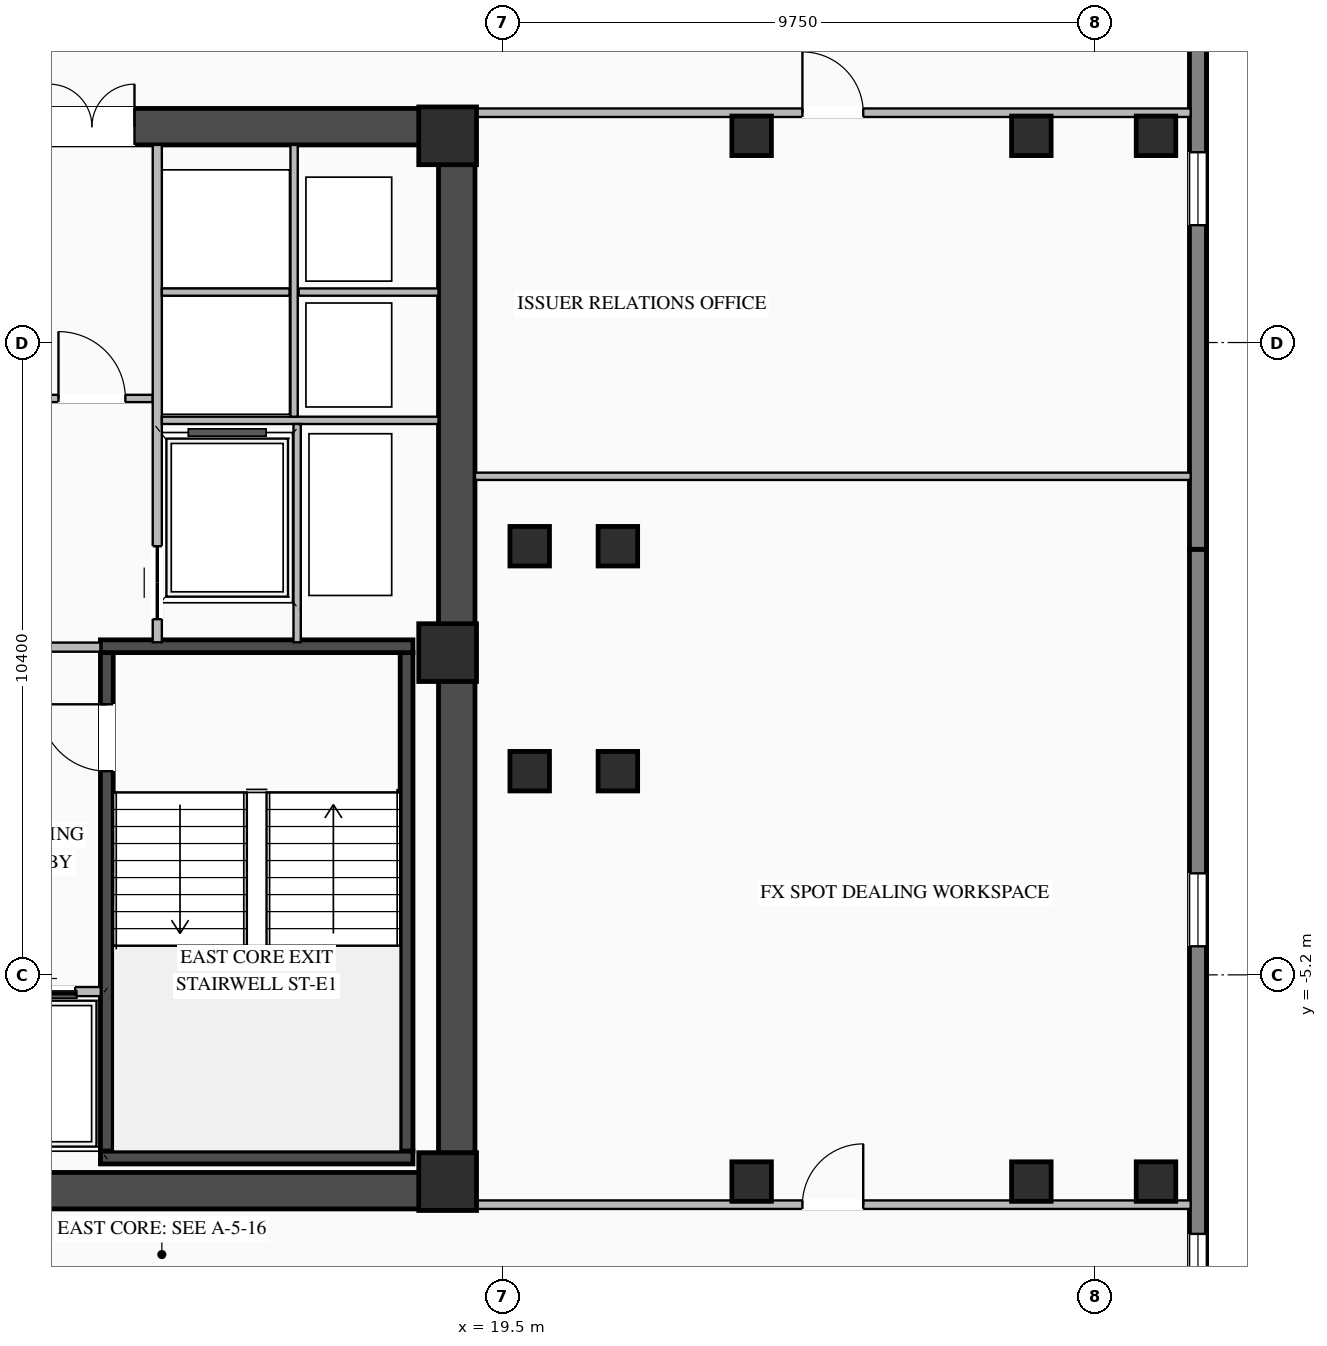
"""IFC4 building model, lengths in metres.
Left out: names, types, materials, properties, quantities, classifications, styles, units other than length and angle.
Written with IfcOpenShell. Run it as: python <this file> out.ifc"""

import sys

from ifc_helpers import new_model, si_unit, direction, frame, frame_2d, origin, origin_2d, place, context, subcontext, project, spatial, rectangle, i_section, extrude, element, fill, save


model = new_model("IFC4")
c1 = context("Model", 3, precision=1e-05, world=origin(), true_north=direction((0.0, 1.0)))
c2 = subcontext(c1, "Body", "Model", "MODEL_VIEW")
j1 = project(units=[si_unit("LENGTHUNIT", "METRE"), si_unit("PLANEANGLEUNIT", "RADIAN")], contexts=[c1])
p1 = place(None, origin())
s1 = spatial("IfcSite", under=j1, at=p1, CompositionType="ELEMENT")
p2 = place(p1, origin())
s2 = spatial("IfcBuilding", under=s1, at=p2, CompositionType="ELEMENT")
p3 = place(p2, frame((0.0, 0.0, 131.2)))
s3 = spatial("IfcBuildingStorey", under=s2, at=p3, CompositionType="ELEMENT", Elevation=131.2)
p4 = place(p3, frame((8.8, -8.75, 0.0), z_axis=(0.0, 0.0, 1.0), x_axis=(1.0, 0.0, 0.0)))
e1 = element("IfcWall", 1, at=p4, inside=s3, PredefinedType="SHEAR", context=c2, shape_type="SweptSolid", body=[
    extrude(rectangle(XDim=10.25, YDim=0.6, at=frame_2d((5.125, 0.0))), origin(), (0.0, 0.0, 1.0), 3.27),
])
p5 = place(p3, frame((8.8, 8.75, 0.0), z_axis=(0.0, 0.0, 1.0), x_axis=(1.0, 0.0, 0.0)))
e2 = element("IfcWall", 2, at=p5, inside=s3, PredefinedType="SHEAR", context=c2, shape_type="SweptSolid", body=[
    extrude(rectangle(XDim=10.25, YDim=0.6, at=frame_2d((5.125, 0.0))), origin(), (0.0, 0.0, 1.0), 3.27),
])
p6 = place(p5, frame((3.25, 0.0, 0.0)))
e3 = element("IfcOpeningElement", 3, at=p6, cuts=e2, PredefinedType="OPENING", context=c2, shape_type="SweptSolid", body=[
    extrude(rectangle(XDim=1.4, YDim=2.05, at=frame_2d((0.7, 1.025))), frame((0.0, 0.31, 0.0), z_axis=(0.0, -1.0, 0.0), x_axis=(1.0, 0.0, 0.0)), (0.0, 0.0, 1.0), 0.62),
])
p7 = place(p3, frame((18.75, -8.45, 0.0), z_axis=(0.0, 0.0, 1.0), x_axis=(0.0, 1.0, 0.0)))
e4 = element("IfcWall", 4, at=p7, inside=s3, PredefinedType="SHEAR", context=c2, shape_type="SweptSolid", body=[
    extrude(rectangle(XDim=16.9, YDim=0.6, at=frame_2d((8.45, 0.0))), origin(), (0.0, 0.0, 1.0), 3.27),
])
p8 = place(p3, frame((12.995, -8.1, 0.0), z_axis=(0.0, 0.0, 1.0), x_axis=(0.0, 1.0, 0.0)))
e5 = element("IfcWall", 5, at=p8, inside=s3, PredefinedType="SHEAR", context=c2, shape_type="SweptSolid", body=[
    extrude(rectangle(XDim=8.2, YDim=0.21, at=frame_2d((4.1, 0.0))), origin(), (0.0, 0.0, 1.0), 3.27),
])
p9 = place(p8, frame((6.25, 0.0, 0.0)))
e6 = element("IfcOpeningElement", 6, at=p9, cuts=e5, PredefinedType="OPENING", context=c2, shape_type="SweptSolid", body=[
    extrude(rectangle(XDim=1.1, YDim=2.15, at=frame_2d((0.55, 1.075))), frame((0.0, 0.115, 0.0), z_axis=(0.0, -1.0, 0.0), x_axis=(1.0, 0.0, 0.0)), (0.0, 0.0, 1.0), 0.23),
])
p10 = place(p3, frame((17.925, -8.1, 0.0), z_axis=(0.0, 0.0, 1.0), x_axis=(0.0, 1.0, 0.0)))
e7 = element("IfcWall", 7, at=p10, inside=s3, PredefinedType="SHEAR", context=c2, shape_type="SweptSolid", body=[
    extrude(rectangle(XDim=8.2, YDim=0.21, at=frame_2d((4.1, 0.0))), origin(), (0.0, 0.0, 1.0), 3.27),
])
for number, where, z_axis, x_axis in (
    (8, (12.89, -8.205, 0.0), (0.0, 0.0, 1.0), (1.0, 0.0, 0.0)),
    (9, (18.03, 0.205, 0.0), (0.0, 0.0, 1.0), (-1.0, 0.0, 0.0)),
):
    element("IfcWall", number, at=place(p3, frame(where, z_axis=z_axis, x_axis=x_axis)), inside=s3, PredefinedType="SHEAR", context=c2, shape_type="SweptSolid", body=[
        extrude(rectangle(XDim=5.14, YDim=0.21, at=frame_2d((2.57, 0.0))), origin(), (0.0, 0.0, 1.0), 3.27),
    ])
for number, where, z_axis, x_axis in (
    (10, (18.6, -8.6, 0.0), (0.0, 0.0, 1.0), (1.0, 0.0, 0.0)),
    (11, (18.6, 0.1, 0.0), (0.0, 0.0, 1.0), (1.0, 0.0, 0.0)),
    (12, (18.6, 8.6, 0.0), (0.0, 0.0, 1.0), (1.0, 0.0, 0.0)),
):
    element("IfcColumn", number, at=place(p3, frame(where, z_axis=z_axis, x_axis=x_axis)), inside=s3, PredefinedType="COLUMN", context=c2, shape_type="SweptSolid", body=[
        extrude(rectangle(XDim=0.95, YDim=0.95, at=origin_2d()), origin(), (0.0, 0.0, 1.0), 3.45),
    ])
for number, where, z_axis, x_axis in (
    (13, (19.95, -1.85, 0.0), (0.0, 0.0, 1.0), (1.0, 0.0, 0.0)),
    (14, (19.95, 1.85, 0.0), (0.0, 0.0, 1.0), (1.0, 0.0, 0.0)),
    (15, (21.4, -1.85, 0.0), (0.0, 0.0, 1.0), (1.0, 0.0, 0.0)),
    (16, (21.4, 1.85, 0.0), (0.0, 0.0, 1.0), (1.0, 0.0, 0.0)),
    (17, (23.6, -8.6, 0.0), (0.0, 0.0, 1.0), (1.0, 0.0, 0.0)),
    (18, (23.6, 8.6, 0.0), (0.0, 0.0, 1.0), (1.0, 0.0, 0.0)),
    (19, (28.2, -8.6, 0.0), (0.0, 0.0, 1.0), (1.0, 0.0, 0.0)),
    (20, (28.2, 8.6, 0.0), (0.0, 0.0, 1.0), (1.0, 0.0, 0.0)),
    (21, (30.25, -8.6, 0.0), (0.0, 0.0, 1.0), (1.0, 0.0, 0.0)),
    (22, (30.25, 8.6, 0.0), (0.0, 0.0, 1.0), (1.0, 0.0, 0.0)),
):
    element("IfcColumn", number, at=place(p3, frame(where, z_axis=z_axis, x_axis=x_axis)), inside=s3, PredefinedType="COLUMN", context=c2, shape_type="SweptSolid", body=[
        extrude(i_section(OverallWidth=0.65, OverallDepth=0.65, WebThickness=0.028, FlangeThickness=0.04, at=origin_2d()), origin(), (0.0, 0.0, 1.0), 3.45),
    ])
p11 = place(p3, frame((30.94, 1.8, 0.0), z_axis=(0.0, 0.0, 1.0), x_axis=(0.0, -1.0, 0.0)))
e23 = element("IfcWall", 23, at=p11, inside=s3, PredefinedType="STANDARD", context=c2, shape_type="SweptSolid", body=[
    extrude(rectangle(XDim=17.79, YDim=0.28, at=frame_2d((8.895, 0.0))), origin(), (0.0, 0.0, 1.0), 3.25),
])
p12 = place(p11, frame((5.33, 0.0, 0.76)))
e24 = element("IfcOpeningElement", 24, at=p12, cuts=e23, PredefinedType="OPENING", context=c2, shape_type="SweptSolid", body=[
    extrude(rectangle(XDim=1.2, YDim=1.95, at=frame_2d((0.6, 0.975))), frame((0.0, 0.15, 0.0), z_axis=(0.0, -1.0, 0.0), x_axis=(1.0, 0.0, 0.0)), (0.0, 0.0, 1.0), 0.3),
])
p13 = place(p11, frame((11.26, 0.0, 0.76)))
e25 = element("IfcOpeningElement", 25, at=p13, cuts=e23, PredefinedType="OPENING", context=c2, shape_type="SweptSolid", body=[
    extrude(rectangle(XDim=1.2, YDim=1.95, at=frame_2d((0.6, 0.975))), frame((0.0, 0.15, 0.0), z_axis=(0.0, -1.0, 0.0), x_axis=(1.0, 0.0, 0.0)), (0.0, 0.0, 1.0), 0.3),
])
p14 = place(p3, frame((30.94, 19.59, 0.0), z_axis=(0.0, 0.0, 1.0), x_axis=(0.0, -1.0, 0.0)))
e26 = element("IfcWall", 26, at=p14, inside=s3, PredefinedType="STANDARD", context=c2, shape_type="SweptSolid", body=[
    extrude(rectangle(XDim=17.79, YDim=0.28, at=frame_2d((8.895, 0.0))), origin(), (0.0, 0.0, 1.0), 3.25),
])
p15 = place(p14, frame((5.33, 0.0, 0.76)))
e27 = element("IfcOpeningElement", 27, at=p15, cuts=e26, PredefinedType="OPENING", context=c2, shape_type="SweptSolid", body=[
    extrude(rectangle(XDim=1.2, YDim=1.95, at=frame_2d((0.6, 0.975))), frame((0.0, 0.15, 0.0), z_axis=(0.0, -1.0, 0.0), x_axis=(1.0, 0.0, 0.0)), (0.0, 0.0, 1.0), 0.3),
])
p16 = place(p14, frame((11.26, 0.0, 0.76)))
e28 = element("IfcOpeningElement", 28, at=p16, cuts=e26, PredefinedType="OPENING", context=c2, shape_type="SweptSolid", body=[
    extrude(rectangle(XDim=1.2, YDim=1.95, at=frame_2d((0.6, 0.975))), frame((0.0, 0.15, 0.0), z_axis=(0.0, -1.0, 0.0), x_axis=(1.0, 0.0, 0.0)), (0.0, 0.0, 1.0), 0.3),
])
p17 = place(p3, frame((9.4, -5.475, 0.0), z_axis=(0.0, 0.0, 1.0), x_axis=(1.0, 0.0, 0.0)))
e29 = element("IfcWall", 29, at=p17, inside=s3, PredefinedType="STANDARD", context=c2, shape_type="SweptSolid", body=[
    extrude(rectangle(XDim=3.495, YDim=0.15, at=frame_2d((1.748, 0.0))), origin(), (0.0, 0.0, 1.0), 3.25),
])
p18 = place(p17, frame((1.975, 0.0, 0.0)))
e30 = element("IfcOpeningElement", 30, at=p18, cuts=e29, PredefinedType="OPENING", context=c2, shape_type="SweptSolid", body=[
    extrude(rectangle(XDim=1.1, YDim=2.15, at=frame_2d((0.55, 1.075))), frame((0.0, 0.085, 0.0), z_axis=(0.0, -1.0, 0.0), x_axis=(1.0, 0.0, 0.0)), (0.0, 0.0, 1.0), 0.17),
])
p19 = place(p17, frame((0.375, 0.0, 0.0)))
e31 = element("IfcOpeningElement", 31, at=p19, cuts=e29, PredefinedType="OPENING", context=c2, shape_type="SweptSolid", body=[
    extrude(rectangle(XDim=0.75, YDim=2.05, at=frame_2d((0.375, 1.025))), frame((0.0, 0.085, 0.0), z_axis=(0.0, -1.0, 0.0), x_axis=(1.0, 0.0, 0.0)), (0.0, 0.0, 1.0), 0.17),
])
p20 = place(p3, frame((9.4, 0.19, 0.0), z_axis=(0.0, 0.0, 1.0), x_axis=(1.0, 0.0, 0.0)))
e32 = element("IfcWall", 32, at=p20, inside=s3, PredefinedType="STANDARD", context=c2, shape_type="SweptSolid", body=[
    extrude(rectangle(XDim=3.49, YDim=0.15, at=frame_2d((1.745, 0.0))), origin(), (0.0, 0.0, 1.0), 2.645),
])
p21 = place(p3, frame((11.75, 4.28, 0.0), z_axis=(0.0, 0.0, 1.0), x_axis=(1.0, 0.0, 0.0)))
e33 = element("IfcWall", 33, at=p21, inside=s3, PredefinedType="STANDARD", context=c2, shape_type="SweptSolid", body=[
    extrude(rectangle(XDim=2.0, YDim=0.12, at=frame_2d((1.0, 0.0))), origin(), (0.0, 0.0, 1.0), 3.25),
])
p22 = place(p21, frame((0.45, 0.0, 0.0)))
e34 = element("IfcOpeningElement", 34, at=p22, cuts=e33, PredefinedType="OPENING", context=c2, shape_type="SweptSolid", body=[
    extrude(rectangle(XDim=1.1, YDim=2.1, at=frame_2d((0.55, 1.05))), frame((0.0, 0.07, 0.0), z_axis=(0.0, -1.0, 0.0), x_axis=(1.0, 0.0, 0.0)), (0.0, 0.0, 1.0), 0.14),
])
p23 = place(p3, frame((13.825, 0.27, 0.0), z_axis=(0.0, 0.0, 1.0), x_axis=(0.0, 1.0, 0.0)))
e35 = element("IfcWall", 35, at=p23, inside=s3, PredefinedType="STANDARD", context=c2, shape_type="SweptSolid", body=[
    extrude(rectangle(XDim=8.18, YDim=0.15, at=frame_2d((4.09, 0.0))), origin(), (0.0, 0.0, 1.0), 3.25),
])
p24 = place(p23, frame((0.38, 0.0, 0.0)))
e36 = element("IfcOpeningElement", 36, at=p24, cuts=e35, PredefinedType="OPENING", context=c2, shape_type="SweptSolid", body=[
    extrude(rectangle(XDim=1.2, YDim=2.1, at=frame_2d((0.6, 1.05))), frame((0.0, 0.085, 0.0), z_axis=(0.0, -1.0, 0.0), x_axis=(1.0, 0.0, 0.0)), (0.0, 0.0, 1.0), 0.17),
])
p25 = place(p3, frame((13.9, 3.92, 0.0), z_axis=(0.0, 0.0, 1.0), x_axis=(1.0, 0.0, 0.0)))
e37 = element("IfcWall", 37, at=p25, inside=s3, PredefinedType="STANDARD", context=c2, shape_type="SweptSolid", body=[
    extrude(rectangle(XDim=4.55, YDim=0.12, at=frame_2d((2.275, 0.0))), origin(), (0.0, 0.0, 1.0), 3.25),
])
p26 = place(p3, frame((16.15, 6.03, 0.0), z_axis=(0.0, 0.0, 1.0), x_axis=(1.0, 0.0, 0.0)))
e38 = element("IfcWall", 38, at=p26, inside=s3, PredefinedType="STANDARD", context=c2, shape_type="SweptSolid", body=[
    extrude(rectangle(XDim=2.3, YDim=0.12, at=frame_2d((1.15, 0.0))), origin(), (0.0, 0.0, 1.0), 3.25),
])
p27 = place(p3, frame((16.075, 3.98, 0.0), z_axis=(0.0, 0.0, 1.0), x_axis=(0.0, 1.0, 0.0)))
e39 = element("IfcWall", 39, at=p27, inside=s3, PredefinedType="STANDARD", context=c2, shape_type="SweptSolid", body=[
    extrude(rectangle(XDim=4.47, YDim=0.12, at=frame_2d((2.235, 0.0))), origin(), (0.0, 0.0, 1.0), 3.25),
])
p28 = place(p3, frame((13.9, 6.03, 0.0), z_axis=(0.0, 0.0, 1.0), x_axis=(1.0, 0.0, 0.0)))
e40 = element("IfcWall", 40, at=p28, inside=s3, PredefinedType="STANDARD", context=c2, shape_type="SweptSolid", body=[
    extrude(rectangle(XDim=2.1, YDim=0.12, at=frame_2d((1.05, 0.0))), origin(), (0.0, 0.0, 1.0), 3.25),
])
p29 = place(p3, frame((16.125, 0.27, 0.0), z_axis=(0.0, 0.0, 1.0), x_axis=(0.0, 1.0, 0.0)))
e41 = element("IfcWall", 41, at=p29, inside=s3, PredefinedType="STANDARD", context=c2, shape_type="SweptSolid", body=[
    extrude(rectangle(XDim=3.59, YDim=0.12, at=frame_2d((1.795, 0.0))), origin(), (0.0, 0.0, 1.0), 3.25),
])
p30 = place(p3, frame((19.05, 8.98, 0.0), z_axis=(0.0, 0.0, 1.0), x_axis=(1.0, 0.0, 0.0)))
e42 = element("IfcWall", 42, at=p30, inside=s3, PredefinedType="STANDARD", context=c2, shape_type="SweptSolid", body=[
    extrude(rectangle(XDim=11.77, YDim=0.14, at=frame_2d((5.885, 0.0))), origin(), (0.0, 0.0, 1.0), 3.25),
])
p31 = place(p30, frame((5.385, 0.0, 0.0)))
e43 = element("IfcOpeningElement", 43, at=p31, cuts=e42, PredefinedType="OPENING", context=c2, shape_type="SweptSolid", body=[
    extrude(rectangle(XDim=1.0, YDim=2.08, at=frame_2d((0.5, 1.04))), frame((0.0, 0.08, 0.0), z_axis=(0.0, -1.0, 0.0), x_axis=(1.0, 0.0, 0.0)), (0.0, 0.0, 1.0), 0.16),
])
p32 = place(p3, frame((19.05, -8.98, 0.0), z_axis=(0.0, 0.0, 1.0), x_axis=(1.0, 0.0, 0.0)))
e44 = element("IfcWall", 44, at=p32, inside=s3, PredefinedType="STANDARD", context=c2, shape_type="SweptSolid", body=[
    extrude(rectangle(XDim=11.77, YDim=0.14, at=frame_2d((5.885, 0.0))), origin(), (0.0, 0.0, 1.0), 3.25),
])
p33 = place(p32, frame((5.385, 0.0, 0.0)))
e45 = element("IfcOpeningElement", 45, at=p33, cuts=e44, PredefinedType="OPENING", context=c2, shape_type="SweptSolid", body=[
    extrude(rectangle(XDim=1.0, YDim=2.08, at=frame_2d((0.5, 1.04))), frame((0.0, 0.08, 0.0), z_axis=(0.0, -1.0, 0.0), x_axis=(1.0, 0.0, 0.0)), (0.0, 0.0, 1.0), 0.16),
])
p34 = place(p3, frame((19.05, 3.0, 0.0), z_axis=(0.0, 0.0, 1.0), x_axis=(1.0, 0.0, 0.0)))
e46 = element("IfcWall", 46, at=p34, inside=s3, PredefinedType="STANDARD", context=c2, shape_type="SweptSolid", body=[
    extrude(rectangle(XDim=11.77, YDim=0.12, at=frame_2d((5.885, 0.0))), origin(), (0.0, 0.0, 1.0), 3.25),
])
p35 = place(p12, origin())
e47 = element("IfcWindow", 47, at=p35, inside=s3, PartitioningType="SINGLE_PANEL", PredefinedType="WINDOW", context=c2, shape_type="SweptSolid", body=[
    extrude(rectangle(XDim=1.2, YDim=1.95, at=frame_2d((0.6, 0.975))), frame((0.0, 0.03, 0.0), z_axis=(0.0, -1.0, 0.0), x_axis=(1.0, 0.0, 0.0)), (0.0, 0.0, 1.0), 0.06),
])
fill(e24, e47)
p36 = place(p13, origin())
e48 = element("IfcWindow", 48, at=p36, inside=s3, PartitioningType="SINGLE_PANEL", PredefinedType="WINDOW", context=c2, shape_type="SweptSolid", body=[
    extrude(rectangle(XDim=1.2, YDim=1.95, at=frame_2d((0.6, 0.975))), frame((0.0, 0.03, 0.0), z_axis=(0.0, -1.0, 0.0), x_axis=(1.0, 0.0, 0.0)), (0.0, 0.0, 1.0), 0.06),
])
fill(e25, e48)
p37 = place(p16, origin())
e49 = element("IfcWindow", 49, at=p37, inside=s3, PartitioningType="SINGLE_PANEL", PredefinedType="WINDOW", context=c2, shape_type="SweptSolid", body=[
    extrude(rectangle(XDim=1.2, YDim=1.95, at=frame_2d((0.6, 0.975))), frame((0.0, 0.03, 0.0), z_axis=(0.0, -1.0, 0.0), x_axis=(1.0, 0.0, 0.0)), (0.0, 0.0, 1.0), 0.06),
])
fill(e28, e49)
p38 = place(p9, origin())
e50 = element("IfcDoor", 50, at=p38, inside=s3, OperationType="SINGLE_SWING_RIGHT", PredefinedType="DOOR", context=c2, shape_type="SweptSolid", body=[
    extrude(rectangle(XDim=1.1, YDim=2.15, at=frame_2d((0.55, 1.075))), frame((0.0, 0.025, 0.0), z_axis=(0.0, -1.0, 0.0), x_axis=(1.0, 0.0, 0.0)), (0.0, 0.0, 1.0), 0.05),
])
fill(e6, e50)
p39 = place(p18, origin())
e51 = element("IfcDoor", 51, at=p39, inside=s3, OperationType="DOUBLE_DOOR_SLIDING", PredefinedType="DOOR", context=c2, shape_type="SweptSolid", body=[
    extrude(rectangle(XDim=1.1, YDim=2.15, at=frame_2d((0.55, 1.075))), frame((0.0, 0.025, 0.0), z_axis=(0.0, -1.0, 0.0), x_axis=(1.0, 0.0, 0.0)), (0.0, 0.0, 1.0), 0.05),
])
fill(e30, e51)
p40 = place(p22, origin())
e52 = element("IfcDoor", 52, at=p40, inside=s3, OperationType="SINGLE_SWING_LEFT", PredefinedType="DOOR", context=c2, shape_type="SweptSolid", body=[
    extrude(rectangle(XDim=1.1, YDim=2.1, at=frame_2d((0.55, 1.05))), frame((0.0, 0.025, 0.0), z_axis=(0.0, -1.0, 0.0), x_axis=(1.0, 0.0, 0.0)), (0.0, 0.0, 1.0), 0.05),
])
fill(e34, e52)
p41 = place(p6, origin())
e53 = element("IfcDoor", 53, at=p41, inside=s3, OperationType="DOUBLE_DOOR_SINGLE_SWING", PredefinedType="DOOR", context=c2, shape_type="SweptSolid", body=[
    extrude(rectangle(XDim=1.4, YDim=2.05, at=frame_2d((0.7, 1.025))), frame((0.0, 0.245, 0.0), z_axis=(0.0, -1.0, 0.0), x_axis=(1.0, 0.0, 0.0)), (0.0, 0.0, 1.0), 0.05),
])
fill(e3, e53)
p42 = place(p24, origin())
e54 = element("IfcDoor", 54, at=p42, inside=s3, OperationType="DOUBLE_DOOR_SLIDING", PredefinedType="DOOR", context=c2, shape_type="SweptSolid", body=[
    extrude(rectangle(XDim=1.2, YDim=2.1, at=frame_2d((0.6, 1.05))), frame((0.0, 0.025, 0.0), z_axis=(0.0, -1.0, 0.0), x_axis=(1.0, 0.0, 0.0)), (0.0, 0.0, 1.0), 0.05),
])
fill(e36, e54)
p43 = place(p31, origin())
e55 = element("IfcDoor", 55, at=p43, inside=s3, OperationType="SINGLE_SWING_LEFT", PredefinedType="DOOR", context=c2, shape_type="SweptSolid", body=[
    extrude(rectangle(XDim=1.0, YDim=2.08, at=frame_2d((0.5, 1.04))), frame((0.0, 0.025, 0.0), z_axis=(0.0, -1.0, 0.0), x_axis=(1.0, 0.0, 0.0)), (0.0, 0.0, 1.0), 0.05),
])
fill(e43, e55)
p44 = place(p33, origin())
e56 = element("IfcDoor", 56, at=p44, inside=s3, OperationType="SINGLE_SWING_RIGHT", PredefinedType="DOOR", context=c2, shape_type="SweptSolid", body=[
    extrude(rectangle(XDim=1.0, YDim=2.08, at=frame_2d((0.5, 1.04))), frame((0.0, 0.025, 0.0), z_axis=(0.0, -1.0, 0.0), x_axis=(1.0, 0.0, 0.0)), (0.0, 0.0, 1.0), 0.05),
])
fill(e45, e56)
save(model, sys.argv[1])
